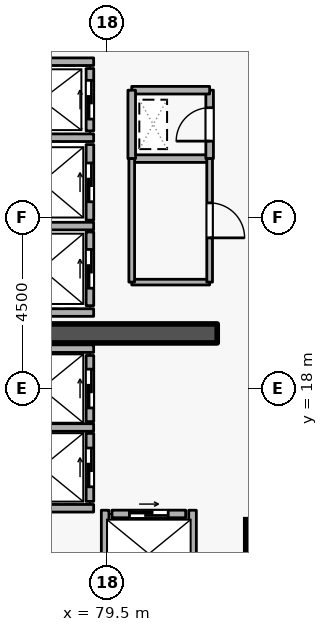
"""IFC4 building model, lengths in metres.
Left out: names, types, materials, properties, quantities, classifications, styles, units other than length and angle.
Written with IfcOpenShell. Run it as: python <this file> out.ifc"""

import sys

from ifc_helpers import new_model, si_unit, direction, frame, frame_2d, origin, origin_2d, place, context, subcontext, project, spatial, rectangle, extrude, element, fill, save


model = new_model("IFC4")
c1 = context("Model", 3, precision=1e-05, world=origin(), true_north=direction((0.0, 1.0)))
c2 = subcontext(c1, "Body", "Model", "MODEL_VIEW")
j1 = project(units=[si_unit("LENGTHUNIT", "METRE"), si_unit("PLANEANGLEUNIT", "RADIAN")], contexts=[c1])
p1 = place(None, origin())
s1 = spatial("IfcSite", under=j1, at=p1, CompositionType="ELEMENT")
p2 = place(p1, origin())
s2 = spatial("IfcBuilding", under=s1, at=p2, CompositionType="ELEMENT")
p3 = place(p2, frame((0.0, 0.0, 196.5)))
s3 = spatial("IfcBuildingStorey", under=s2, at=p3, CompositionType="ELEMENT", Elevation=196.5)
p4 = place(p3, frame((76.6, 19.45, 0.0), z_axis=(0.0, 0.0, 1.0), x_axis=(1.0, 0.0, 0.0)))
e1 = element("IfcWall", 1, at=p4, inside=s3, PredefinedType="SHEAR", context=c2, shape_type="SweptSolid", body=[
    extrude(rectangle(XDim=5.8, YDim=0.5, at=frame_2d((2.9, 0.0))), origin(), (0.0, 0.0, 1.0), 3.6),
])
p5 = place(p3, frame((83.7, 14.0, 0.0), z_axis=(0.0, 0.0, 1.0), x_axis=(1.0, 0.0, 0.0)))
e2 = element("IfcColumn", 2, at=p5, inside=s3, PredefinedType="COLUMN", context=c2, shape_type="SweptSolid", body=[
    extrude(rectangle(XDim=1.1, YDim=1.1, at=origin_2d()), origin(), (0.0, 0.0, 1.0), 3.6),
])
p6 = place(p3, frame((79.05, 24.78, 0.0), z_axis=(0.0, 0.0, 1.0), x_axis=(0.0, 1.0, 0.0)))
e3 = element("IfcWall", 3, at=p6, inside=s3, PredefinedType="STANDARD", context=c2, shape_type="SweptSolid", body=[
    extrude(rectangle(XDim=1.64, YDim=0.2, at=frame_2d((0.82, 0.0))), origin(), (0.0, 0.0, 1.0), 3.32),
])
p7 = place(p6, frame((0.31, 0.0, 0.0)))
e4 = element("IfcOpeningElement", 4, at=p7, cuts=e3, PredefinedType="OPENING", context=c2, shape_type="SweptSolid", body=[
    extrude(rectangle(XDim=1.02, YDim=2.06, at=frame_2d((0.51, 1.03))), frame((0.0, 0.11, 0.0), z_axis=(0.0, -1.0, 0.0), x_axis=(1.0, 0.0, 0.0)), (0.0, 0.0, 1.0), 0.22),
])
p8 = place(p3, frame((79.05, 22.43, 0.0), z_axis=(0.0, 0.0, 1.0), x_axis=(0.0, 1.0, 0.0)))
e5 = element("IfcWall", 5, at=p8, inside=s3, PredefinedType="STANDARD", context=c2, shape_type="SweptSolid", body=[
    extrude(rectangle(XDim=1.99, YDim=0.2, at=frame_2d((0.995, 0.0))), origin(), (0.0, 0.0, 1.0), 3.32),
])
p9 = place(p8, frame((0.485, 0.0, 0.0)))
e6 = element("IfcOpeningElement", 6, at=p9, cuts=e5, PredefinedType="OPENING", context=c2, shape_type="SweptSolid", body=[
    extrude(rectangle(XDim=1.02, YDim=2.06, at=frame_2d((0.51, 1.03))), frame((0.0, 0.11, 0.0), z_axis=(0.0, -1.0, 0.0), x_axis=(1.0, 0.0, 0.0)), (0.0, 0.0, 1.0), 0.22),
])
p10 = place(p3, frame((79.05, 20.18, 0.0), z_axis=(0.0, 0.0, 1.0), x_axis=(0.0, 1.0, 0.0)))
e7 = element("IfcWall", 7, at=p10, inside=s3, PredefinedType="STANDARD", context=c2, shape_type="SweptSolid", body=[
    extrude(rectangle(XDim=1.94, YDim=0.2, at=frame_2d((0.97, 0.0))), origin(), (0.0, 0.0, 1.0), 3.32),
])
p11 = place(p10, frame((0.46, 0.0, 0.0)))
e8 = element("IfcOpeningElement", 8, at=p11, cuts=e7, PredefinedType="OPENING", context=c2, shape_type="SweptSolid", body=[
    extrude(rectangle(XDim=1.02, YDim=2.06, at=frame_2d((0.51, 1.03))), frame((0.0, 0.11, 0.0), z_axis=(0.0, -1.0, 0.0), x_axis=(1.0, 0.0, 0.0)), (0.0, 0.0, 1.0), 0.22),
])
p12 = place(p3, frame((79.05, 17.13, 0.0), z_axis=(0.0, 0.0, 1.0), x_axis=(0.0, 1.0, 0.0)))
e9 = element("IfcWall", 9, at=p12, inside=s3, PredefinedType="STANDARD", context=c2, shape_type="SweptSolid", body=[
    extrude(rectangle(XDim=1.74, YDim=0.2, at=frame_2d((0.87, 0.0))), origin(), (0.0, 0.0, 1.0), 3.32),
])
p13 = place(p12, frame((0.36, 0.0, 0.0)))
e10 = element("IfcOpeningElement", 10, at=p13, cuts=e9, PredefinedType="OPENING", context=c2, shape_type="SweptSolid", body=[
    extrude(rectangle(XDim=1.02, YDim=2.06, at=frame_2d((0.51, 1.03))), frame((0.0, 0.11, 0.0), z_axis=(0.0, -1.0, 0.0), x_axis=(1.0, 0.0, 0.0)), (0.0, 0.0, 1.0), 0.22),
])
p14 = place(p3, frame((79.05, 15.03, 0.0), z_axis=(0.0, 0.0, 1.0), x_axis=(0.0, 1.0, 0.0)))
e11 = element("IfcWall", 11, at=p14, inside=s3, PredefinedType="STANDARD", context=c2, shape_type="SweptSolid", body=[
    extrude(rectangle(XDim=1.79, YDim=0.2, at=frame_2d((0.895, 0.0))), origin(), (0.0, 0.0, 1.0), 3.32),
])
p15 = place(p14, frame((0.385, 0.0, 0.0)))
e12 = element("IfcOpeningElement", 12, at=p15, cuts=e11, PredefinedType="OPENING", context=c2, shape_type="SweptSolid", body=[
    extrude(rectangle(XDim=1.02, YDim=2.06, at=frame_2d((0.51, 1.03))), frame((0.0, 0.11, 0.0), z_axis=(0.0, -1.0, 0.0), x_axis=(1.0, 0.0, 0.0)), (0.0, 0.0, 1.0), 0.22),
])
p16 = place(p3, frame((79.63, 14.7, 0.0), z_axis=(0.0, 0.0, 1.0), x_axis=(1.0, 0.0, 0.0)))
e13 = element("IfcWall", 13, at=p16, inside=s3, PredefinedType="STANDARD", context=c2, shape_type="SweptSolid", body=[
    extrude(rectangle(XDim=1.94, YDim=0.2, at=frame_2d((0.97, 0.0))), origin(), (0.0, 0.0, 1.0), 3.32),
])
p17 = place(p16, frame((0.46, 0.0, 0.0)))
e14 = element("IfcOpeningElement", 14, at=p17, cuts=e13, PredefinedType="OPENING", context=c2, shape_type="SweptSolid", body=[
    extrude(rectangle(XDim=1.02, YDim=2.06, at=frame_2d((0.51, 1.03))), frame((0.0, 0.11, 0.0), z_axis=(0.0, -1.0, 0.0), x_axis=(1.0, 0.0, 0.0)), (0.0, 0.0, 1.0), 0.22),
])
p18 = place(p3, frame((76.612, 26.6, 0.0), z_axis=(0.0, 0.0, 1.0), x_axis=(1.0, 0.0, 0.0)))
e15 = element("IfcWall", 15, at=p18, inside=s3, PredefinedType="STANDARD", context=c2, shape_type="SweptSolid", body=[
    extrude(rectangle(XDim=2.536, YDim=0.2, at=frame_2d((1.268, 0.0))), origin(), (0.0, 0.0, 1.0), 1.785),
])
for number, where, z_axis, x_axis in (
    (16, (76.612, 24.6, 0.0), (0.0, 0.0, 1.0), (1.0, 0.0, 0.0)),
    (17, (76.612, 22.275, 0.0), (0.0, 0.0, 1.0), (1.0, 0.0, 0.0)),
    (18, (76.612, 20.0, 0.0), (0.0, 0.0, 1.0), (1.0, 0.0, 0.0)),
):
    element("IfcWall", number, at=place(p3, frame(where, z_axis=z_axis, x_axis=x_axis)), inside=s3, PredefinedType="STANDARD", context=c2, shape_type="SweptSolid", body=[
        extrude(rectangle(XDim=2.536, YDim=0.2, at=frame_2d((1.268, 0.0))), origin(), (0.0, 0.0, 1.0), 3.32),
    ])
p19 = place(p3, frame((76.402, 19.05, 0.0), z_axis=(0.0, 0.0, 1.0), x_axis=(1.0, 0.0, 0.0)))
e19 = element("IfcWall", 19, at=p19, inside=s3, PredefinedType="STANDARD", context=c2, shape_type="SweptSolid", body=[
    extrude(rectangle(XDim=2.746, YDim=0.2, at=frame_2d((1.373, 0.0))), origin(), (0.0, 0.0, 1.0), 2.525),
])
p20 = place(p3, frame((76.402, 16.975, 0.0), z_axis=(0.0, 0.0, 1.0), x_axis=(1.0, 0.0, 0.0)))
e20 = element("IfcWall", 20, at=p20, inside=s3, PredefinedType="STANDARD", context=c2, shape_type="SweptSolid", body=[
    extrude(rectangle(XDim=2.746, YDim=0.2, at=frame_2d((1.373, 0.0))), origin(), (0.0, 0.0, 1.0), 3.32),
])
p21 = place(p3, frame((76.512, 14.85, 0.0), z_axis=(0.0, 0.0, 1.0), x_axis=(1.0, 0.0, 0.0)))
e21 = element("IfcWall", 21, at=p21, inside=s3, PredefinedType="STANDARD", context=c2, shape_type="SweptSolid", body=[
    extrude(rectangle(XDim=2.636, YDim=0.2, at=frame_2d((1.318, 0.0))), origin(), (0.0, 0.0, 1.0), 3.32),
])
for number, where, z_axis, x_axis in (
    (22, (81.75, 12.612, 0.0), (0.0, 0.0, 1.0), (0.0, 1.0, 0.0)),
    (23, (79.45, 12.612, 0.0), (0.0, 0.0, 1.0), (0.0, 1.0, 0.0)),
):
    element("IfcWall", number, at=place(p3, frame(where, z_axis=z_axis, x_axis=x_axis)), inside=s3, PredefinedType="STANDARD", context=c2, shape_type="SweptSolid", body=[
        extrude(rectangle(XDim=2.186, YDim=0.2, at=frame_2d((1.093, 0.0))), origin(), (0.0, 0.0, 1.0), 3.32),
    ])
p22 = place(p3, frame((80.15, 24.05, 0.0), z_axis=(0.0, 0.0, 1.0), x_axis=(1.0, 0.0, 0.0)))
e24 = element("IfcWall", 24, at=p22, inside=s3, PredefinedType="STANDARD", context=c2, shape_type="SweptSolid", body=[
    extrude(rectangle(XDim=2.05, YDim=0.2, at=frame_2d((1.025, 0.0))), origin(), (0.0, 0.0, 1.0), 3.32),
])
p23 = place(p3, frame((82.2, 24.05, 0.0), z_axis=(0.0, 0.0, 1.0), x_axis=(0.0, 1.0, 0.0)))
e25 = element("IfcWall", 25, at=p23, inside=s3, PredefinedType="STANDARD", context=c2, shape_type="SweptSolid", body=[
    extrude(rectangle(XDim=1.8, YDim=0.2, at=frame_2d((0.9, 0.0))), origin(), (0.0, 0.0, 1.0), 3.32),
])
p24 = place(p23, frame((0.46, 0.0, 0.0)))
e26 = element("IfcOpeningElement", 26, at=p24, cuts=e25, PredefinedType="OPENING", context=c2, shape_type="SweptSolid", body=[
    extrude(rectangle(XDim=0.88, YDim=2.04, at=frame_2d((0.44, 1.02))), frame((0.0, 0.11, 0.0), z_axis=(0.0, -1.0, 0.0), x_axis=(1.0, 0.0, 0.0)), (0.0, 0.0, 1.0), 0.22),
])
p25 = place(p3, frame((82.2, 25.85, 0.0), z_axis=(0.0, 0.0, 1.0), x_axis=(-1.0, 0.0, 0.0)))
e27 = element("IfcWall", 27, at=p25, inside=s3, PredefinedType="STANDARD", context=c2, shape_type="SweptSolid", body=[
    extrude(rectangle(XDim=2.05, YDim=0.2, at=frame_2d((1.025, 0.0))), origin(), (0.0, 0.0, 1.0), 3.32),
])
p26 = place(p3, frame((80.15, 25.85, 0.0), z_axis=(0.0, 0.0, 1.0), x_axis=(0.0, -1.0, 0.0)))
e28 = element("IfcWall", 28, at=p26, inside=s3, PredefinedType="STANDARD", context=c2, shape_type="SweptSolid", body=[
    extrude(rectangle(XDim=1.8, YDim=0.2, at=frame_2d((0.9, 0.0))), origin(), (0.0, 0.0, 1.0), 3.32),
])
p27 = place(p3, frame((82.2, 20.8, 0.0), z_axis=(0.0, 0.0, 1.0), x_axis=(-1.0, 0.0, 0.0)))
e29 = element("IfcWall", 29, at=p27, inside=s3, PredefinedType="PARTITIONING", context=c2, shape_type="SweptSolid", body=[
    extrude(rectangle(XDim=2.05, YDim=0.15, at=frame_2d((1.025, 0.0))), origin(), (0.0, 0.0, 1.0), 3.32),
])
p28 = place(p3, frame((80.15, 20.8, 0.0), z_axis=(0.0, 0.0, 1.0), x_axis=(0.0, 1.0, 0.0)))
e30 = element("IfcWall", 30, at=p28, inside=s3, PredefinedType="PARTITIONING", context=c2, shape_type="SweptSolid", body=[
    extrude(rectangle(XDim=3.25, YDim=0.15, at=frame_2d((1.625, 0.0))), origin(), (0.0, 0.0, 1.0), 3.32),
])
p29 = place(p3, frame((82.2, 24.05, 0.0), z_axis=(0.0, 0.0, 1.0), x_axis=(0.0, -1.0, 0.0)))
e31 = element("IfcWall", 31, at=p29, inside=s3, PredefinedType="PARTITIONING", context=c2, shape_type="SweptSolid", body=[
    extrude(rectangle(XDim=3.25, YDim=0.15, at=frame_2d((1.625, 0.0))), origin(), (0.0, 0.0, 1.0), 3.32),
])
p30 = place(p29, frame((1.165, 0.0, 0.0)))
e32 = element("IfcOpeningElement", 32, at=p30, cuts=e31, PredefinedType="OPENING", context=c2, shape_type="SweptSolid", body=[
    extrude(rectangle(XDim=0.92, YDim=2.08, at=frame_2d((0.46, 1.04))), frame((0.0, 0.085, 0.0), z_axis=(0.0, -1.0, 0.0), x_axis=(1.0, 0.0, 0.0)), (0.0, 0.0, 1.0), 0.17),
])
p31 = place(p7, origin())
e33 = element("IfcDoor", 33, at=p31, inside=s3, OperationType="SLIDING_TO_LEFT", PredefinedType="DOOR", context=c2, shape_type="SweptSolid", body=[
    extrude(rectangle(XDim=1.02, YDim=2.06, at=frame_2d((0.51, 1.03))), frame((0.0, 0.025, 0.0), z_axis=(0.0, -1.0, 0.0), x_axis=(1.0, 0.0, 0.0)), (0.0, 0.0, 1.0), 0.05),
])
fill(e4, e33)
p32 = place(p9, origin())
e34 = element("IfcDoor", 34, at=p32, inside=s3, OperationType="SLIDING_TO_LEFT", PredefinedType="DOOR", context=c2, shape_type="SweptSolid", body=[
    extrude(rectangle(XDim=1.02, YDim=2.06, at=frame_2d((0.51, 1.03))), frame((0.0, 0.025, 0.0), z_axis=(0.0, -1.0, 0.0), x_axis=(1.0, 0.0, 0.0)), (0.0, 0.0, 1.0), 0.05),
])
fill(e6, e34)
p33 = place(p11, origin())
e35 = element("IfcDoor", 35, at=p33, inside=s3, OperationType="SLIDING_TO_LEFT", PredefinedType="DOOR", context=c2, shape_type="SweptSolid", body=[
    extrude(rectangle(XDim=1.02, YDim=2.06, at=frame_2d((0.51, 1.03))), frame((0.0, 0.025, 0.0), z_axis=(0.0, -1.0, 0.0), x_axis=(1.0, 0.0, 0.0)), (0.0, 0.0, 1.0), 0.05),
])
fill(e8, e35)
p34 = place(p13, origin())
e36 = element("IfcDoor", 36, at=p34, inside=s3, OperationType="SLIDING_TO_LEFT", PredefinedType="DOOR", context=c2, shape_type="SweptSolid", body=[
    extrude(rectangle(XDim=1.02, YDim=2.06, at=frame_2d((0.51, 1.03))), frame((0.0, 0.025, 0.0), z_axis=(0.0, -1.0, 0.0), x_axis=(1.0, 0.0, 0.0)), (0.0, 0.0, 1.0), 0.05),
])
fill(e10, e36)
p35 = place(p15, origin())
e37 = element("IfcDoor", 37, at=p35, inside=s3, OperationType="SLIDING_TO_LEFT", PredefinedType="DOOR", context=c2, shape_type="SweptSolid", body=[
    extrude(rectangle(XDim=1.02, YDim=2.06, at=frame_2d((0.51, 1.03))), frame((0.0, 0.025, 0.0), z_axis=(0.0, -1.0, 0.0), x_axis=(1.0, 0.0, 0.0)), (0.0, 0.0, 1.0), 0.05),
])
fill(e12, e37)
p36 = place(p17, origin())
e38 = element("IfcDoor", 38, at=p36, inside=s3, OperationType="SLIDING_TO_LEFT", PredefinedType="DOOR", context=c2, shape_type="SweptSolid", body=[
    extrude(rectangle(XDim=1.02, YDim=2.06, at=frame_2d((0.51, 1.03))), frame((0.0, 0.025, 0.0), z_axis=(0.0, -1.0, 0.0), x_axis=(1.0, 0.0, 0.0)), (0.0, 0.0, 1.0), 0.05),
])
fill(e14, e38)
p37 = place(p24, origin())
e39 = element("IfcDoor", 39, at=p37, inside=s3, OperationType="SINGLE_SWING_LEFT", PredefinedType="DOOR", context=c2, shape_type="SweptSolid", body=[
    extrude(rectangle(XDim=0.88, YDim=2.04, at=frame_2d((0.44, 1.02))), frame((0.0, 0.025, 0.0), z_axis=(0.0, -1.0, 0.0), x_axis=(1.0, 0.0, 0.0)), (0.0, 0.0, 1.0), 0.05),
])
fill(e26, e39)
p38 = place(p30, origin())
e40 = element("IfcDoor", 40, at=p38, inside=s3, OperationType="SINGLE_SWING_RIGHT", PredefinedType="DOOR", context=c2, shape_type="SweptSolid", body=[
    extrude(rectangle(XDim=0.92, YDim=2.08, at=frame_2d((0.46, 1.04))), frame((0.0, 0.025, 0.0), z_axis=(0.0, -1.0, 0.0), x_axis=(1.0, 0.0, 0.0)), (0.0, 0.0, 1.0), 0.05),
])
fill(e32, e40)
save(model, sys.argv[1])
